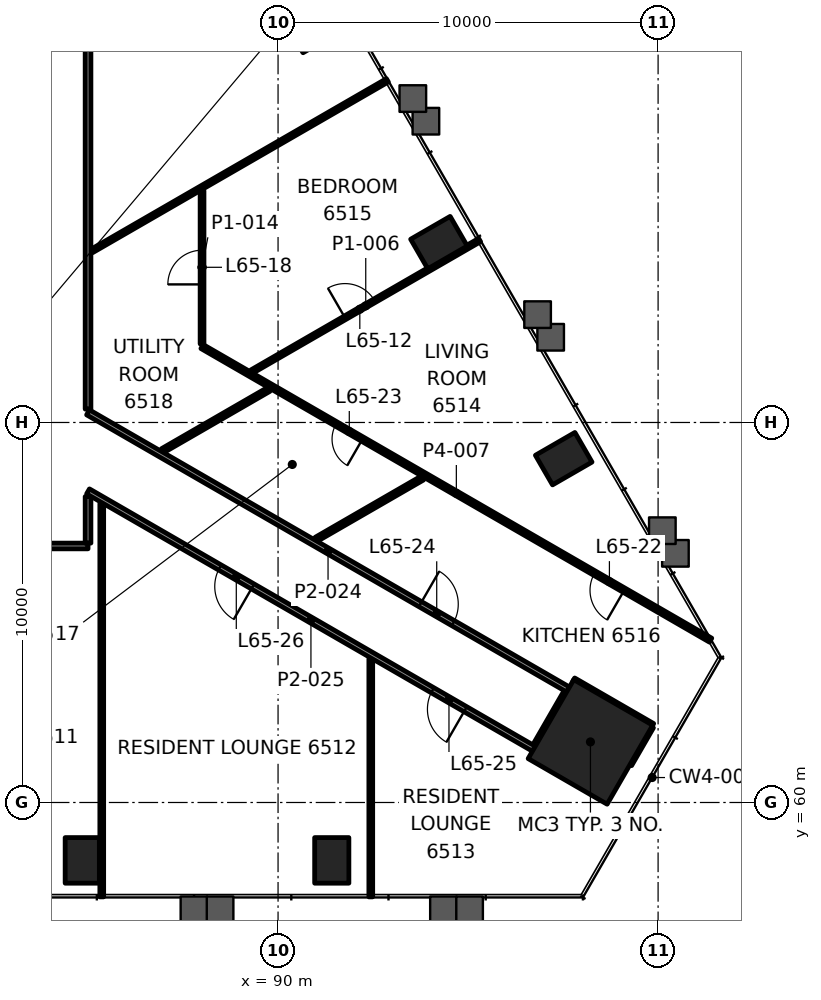
"""IFC4 building model, lengths in metres.
Left out: names, types, materials, properties, quantities, classifications, styles, units other than length and angle.
Written with IfcOpenShell. Run it as: python <this file> out.ifc"""

import sys

from ifc_helpers import new_model, si_unit, direction, frame, frame_2d, origin, origin_2d, place, context, subcontext, project, spatial, rectangle, hollow_rectangle, extrude, element, fill, save


model = new_model("IFC4")
c1 = context("Model", 3, precision=1e-05, world=origin(), true_north=direction((0.0, 1.0)))
c2 = subcontext(c1, "Body", "Model", "MODEL_VIEW")
j1 = project(units=[si_unit("LENGTHUNIT", "METRE"), si_unit("PLANEANGLEUNIT", "RADIAN")], contexts=[c1])
p1 = place(None, origin())
s1 = spatial("IfcSite", under=j1, at=p1, CompositionType="ELEMENT")
p2 = place(p1, origin())
s2 = spatial("IfcBuilding", under=s1, at=p2, CompositionType="ELEMENT")
p3 = place(p2, frame((0.0, 0.0, 274.1)))
s3 = spatial("IfcBuildingStorey", under=s2, at=p3, CompositionType="ELEMENT", Elevation=274.1)
p4 = place(p3, frame((98.22, 61.594, 0.0), z_axis=(0.0, 0.0, 1.0), x_axis=(0.5, 0.866025403784, 0.0)))
e1 = element("IfcColumn", 1, at=p4, inside=s3, PredefinedType="COLUMN", context=c2, shape_type="SweptSolid", body=[
    extrude(rectangle(XDim=2.4, YDim=2.4, at=origin_2d()), origin(), (0.0, 0.0, 1.0), 3.5),
])
for number, where, z_axis, x_axis in (
    (2, (84.848, 58.476, -0.0), (0.0, 0.0, 1.0), (1.0, 0.0, 0.0)),
    (3, (91.413, 58.476, -0.0), (0.0, 0.0, 1.0), (1.0, 0.0, 0.0)),
    (4, (97.517, 69.047, -0.0), (0.0, 0.0, 1.0), (-0.5, 0.866, 0.0)),
    (5, (94.234, 74.733, -0.0), (0.0, 0.0, 1.0), (-0.5, 0.866, 0.0)),
    (6, (90.951, 80.419, -0.0), (0.0, 0.0, 1.0), (-0.5, 0.866, 0.0)),
):
    element("IfcColumn", number, at=place(p3, frame(where, z_axis=z_axis, x_axis=x_axis)), inside=s3, PredefinedType="COLUMN", context=c2, shape_type="SweptSolid", body=[
        extrude(hollow_rectangle(XDim=0.9, YDim=1.2, WallThickness=0.06, at=origin_2d()), origin(), (0.0, 0.0, 1.0), 3.5),
    ])
p5 = place(p3, frame((85.0, 66.75, 0.0), z_axis=(0.0, 0.0, 1.0), x_axis=(-1.0, 0.0, 0.0)))
e7 = element("IfcWall", 7, at=p5, inside=s3, PredefinedType="PARTITIONING", context=c2, shape_type="SweptSolid", body=[
    extrude(rectangle(XDim=19.999, YDim=0.15, at=frame_2d((10.0, 0.0))), origin(), (0.0, 0.0, 1.0), 2.7),
])
p6 = place(p5, frame((2.96, 0.0, 0.0)))
e8 = element("IfcOpeningElement", 8, at=p6, cuts=e7, PredefinedType="OPENING", context=c2, shape_type="SweptSolid", body=[
    extrude(rectangle(XDim=1.0, YDim=2.1, at=frame_2d((0.5, 1.05))), frame((0.0, 0.085, 0.0), z_axis=(0.0, -1.0, 0.0), x_axis=(1.0, 0.0, 0.0)), (0.0, 0.0, 1.0), 0.17),
])
p7 = place(p5, frame((7.361, 0.0, 0.0)))
e9 = element("IfcOpeningElement", 9, at=p7, cuts=e7, PredefinedType="OPENING", context=c2, shape_type="SweptSolid", body=[
    extrude(rectangle(XDim=0.9, YDim=2.1, at=frame_2d((0.45, 1.05))), frame((0.0, 0.085, 0.0), z_axis=(0.0, -1.0, 0.0), x_axis=(1.0, 0.0, 0.0)), (0.0, 0.0, 1.0), 0.17),
])
p8 = place(p5, frame((9.55, 0.0, 0.0)))
e10 = element("IfcOpeningElement", 10, at=p8, cuts=e7, PredefinedType="OPENING", context=c2, shape_type="SweptSolid", body=[
    extrude(rectangle(XDim=0.9, YDim=2.1, at=frame_2d((0.45, 1.05))), frame((0.0, 0.085, 0.0), z_axis=(0.0, -1.0, 0.0), x_axis=(1.0, 0.0, 0.0)), (0.0, 0.0, 1.0), 0.17),
])
p9 = place(p5, frame((11.738, 0.0, 0.0)))
e11 = element("IfcOpeningElement", 11, at=p9, cuts=e7, PredefinedType="OPENING", context=c2, shape_type="SweptSolid", body=[
    extrude(rectangle(XDim=0.9, YDim=2.1, at=frame_2d((0.45, 1.05))), frame((0.0, 0.085, 0.0), z_axis=(0.0, -1.0, 0.0), x_axis=(1.0, 0.0, 0.0)), (0.0, 0.0, 1.0), 0.17),
])
p10 = place(p5, frame((13.926, 0.0, 0.0)))
e12 = element("IfcOpeningElement", 12, at=p10, cuts=e7, PredefinedType="OPENING", context=c2, shape_type="SweptSolid", body=[
    extrude(rectangle(XDim=0.9, YDim=2.1, at=frame_2d((0.45, 1.05))), frame((0.0, 0.085, 0.0), z_axis=(0.0, -1.0, 0.0), x_axis=(1.0, 0.0, 0.0)), (0.0, 0.0, 1.0), 0.17),
])
p11 = place(p3, frame((91.005, 66.926, 0.0), z_axis=(0.0, 0.0, 1.0), x_axis=(0.866000447062, 0.500043223821, 0.0)))
e13 = element("IfcWall", 13, at=p11, inside=s3, PredefinedType="PARTITIONING", context=c2, shape_type="SweptSolid", body=[
    extrude(rectangle(XDim=3.228, YDim=0.12, at=frame_2d((1.614, 0.0))), origin(), (0.0, 0.0, 1.0), 2.7),
])
p12 = place(p3, frame((86.963, 69.259, 0.0), z_axis=(0.0, 0.0, 1.0), x_axis=(0.866033195618, 0.499986503906, 0.0)))
e14 = element("IfcWall", 14, at=p12, inside=s3, PredefinedType="PARTITIONING", context=c2, shape_type="SweptSolid", body=[
    extrude(rectangle(XDim=3.228, YDim=0.12, at=frame_2d((1.614, 0.0))), origin(), (0.0, 0.0, 1.0), 2.7),
])
p13 = place(p3, frame((89.311, 71.34, 0.0), z_axis=(0.0, 0.0, 1.0), x_axis=(0.866013442838, 0.500020716395, 0.0)))
e15 = element("IfcWall", 15, at=p13, inside=s3, PredefinedType="PARTITIONING", context=c2, shape_type="SweptSolid", body=[
    extrude(rectangle(XDim=6.92, YDim=0.1, at=frame_2d((3.46, 0.0))), origin(), (0.0, 0.0, 1.0), 2.688),
])
p14 = place(p13, frame((2.83, 0.0, 0.0)))
e16 = element("IfcOpeningElement", 16, at=p14, cuts=e15, PredefinedType="OPENING", context=c2, shape_type="SweptSolid", body=[
    extrude(rectangle(XDim=0.9, YDim=2.1, at=frame_2d((0.45, 1.05))), frame((0.0, 0.06, 0.0), z_axis=(0.0, -1.0, 0.0), x_axis=(1.0, 0.0, 0.0)), (0.0, 0.0, 1.0), 0.12),
])
p15 = place(p3, frame((85.101, 74.514, 0.0), z_axis=(0.0, 0.0, 1.0), x_axis=(0.866020765707, 0.500008033299, 0.0)))
e17 = element("IfcWall", 17, at=p15, inside=s3, PredefinedType="PARTITIONING", context=c2, shape_type="SweptSolid", body=[
    extrude(rectangle(XDim=8.979, YDim=0.1, at=frame_2d((4.489, 0.0))), origin(), (0.0, 0.0, 1.0), 2.688),
])
p16 = place(p3, frame((99.259, 60.994, 0.0), z_axis=(0.0, 0.0, 1.0), x_axis=(0.499906209203, 0.866079547155, 0.0)))
e18 = element("IfcWall", 18, at=p16, inside=s3, PredefinedType="PARTITIONING", context=c2, shape_type="SweptSolid", body=[
    extrude(rectangle(XDim=1.15, YDim=0.1, at=frame_2d((0.575, 0.0))), origin(), (0.0, 0.0, 1.0), 2.7),
])
p17 = place(p3, frame((96.769, 61.48, 0.0), z_axis=(0.0, 0.0, 1.0), x_axis=(0.500035172766, 0.866005095826, 0.0)))
e19 = element("IfcWall", 19, at=p17, inside=s3, PredefinedType="PARTITIONING", context=c2, shape_type="SweptSolid", body=[
    extrude(rectangle(XDim=1.645, YDim=0.15, at=frame_2d((0.822, 0.0))), origin(), (0.0, 0.0, 1.0), 2.547),
])
p18 = place(p3, frame((92.44, 57.516, 0.0), z_axis=(0.0, 0.0, 1.0), x_axis=(0.0, 1.0, 0.0)))
e20 = element("IfcWall", 20, at=p18, inside=s3, PredefinedType="PARTITIONING", context=c2, shape_type="SweptSolid", body=[
    extrude(rectangle(XDim=6.259, YDim=0.1, at=frame_2d((3.129, 0.0))), origin(), (0.0, 0.0, 1.0), 2.7),
])
p19 = place(p3, frame((88.0, 72.067, 0.0), z_axis=(0.0, 0.0, 1.0), x_axis=(0.0, 1.0, 0.0)))
e21 = element("IfcWall", 21, at=p19, inside=s3, PredefinedType="PARTITIONING", context=c2, shape_type="SweptSolid", body=[
    extrude(rectangle(XDim=4.033, YDim=0.1, at=frame_2d((2.017, 0.0))), origin(), (0.0, 0.0, 1.0), 2.7),
])
p20 = place(p19, frame((1.567, 0.0, 0.0)))
e22 = element("IfcOpeningElement", 22, at=p20, cuts=e21, PredefinedType="OPENING", context=c2, shape_type="SweptSolid", body=[
    extrude(rectangle(XDim=0.9, YDim=2.1, at=frame_2d((0.45, 1.05))), frame((0.0, 0.06, 0.0), z_axis=(0.0, -1.0, 0.0), x_axis=(1.0, 0.0, 0.0)), (0.0, 0.0, 1.0), 0.12),
])
p21 = place(p3, frame((85.361, 57.516, 0.0), z_axis=(0.0, 0.0, 1.0), x_axis=(0.0, 1.0, 0.0)))
e23 = element("IfcWall", 23, at=p21, inside=s3, PredefinedType="PARTITIONING", context=c2, shape_type="SweptSolid", body=[
    extrude(rectangle(XDim=10.346, YDim=0.1, at=frame_2d((5.173, 0.0))), origin(), (0.0, 0.0, 1.0), 2.547),
])
p22 = place(p3, frame((85.0, 66.825, 0.0), z_axis=(0.0, 0.0, 1.0), x_axis=(0.0, 1.0, 0.0)))
e24 = element("IfcWall", 24, at=p22, inside=s3, PredefinedType="PARTITIONING", context=c2, shape_type="SweptSolid", body=[
    extrude(rectangle(XDim=1.225, YDim=0.15, at=frame_2d((0.613, 0.0))), origin(), (0.0, 0.0, 1.0), 2.547),
])
p23 = place(p3, frame((85.0, 70.352, 0.0), z_axis=(0.0, 0.0, 1.0), x_axis=(0.0, 1.0, 0.0)))
e25 = element("IfcWall", 25, at=p23, inside=s3, PredefinedType="PARTITIONING", context=c2, shape_type="SweptSolid", body=[
    extrude(rectangle(XDim=12.897, YDim=0.15, at=frame_2d((6.449, 0.0))), origin(), (0.0, 0.0, 1.0), 2.7),
])
p24 = place(p3, frame((101.383, 64.271, 0.0), z_axis=(0.0, 0.0, 1.0), x_axis=(-0.86602851656, 0.499994608475, 0.0)))
e26 = element("IfcWall", 26, at=p24, inside=s3, PredefinedType="PARTITIONING", context=c2, shape_type="SweptSolid", body=[
    extrude(rectangle(XDim=15.453, YDim=0.12, at=frame_2d((7.727, 0.0))), origin(), (0.0, 0.0, 1.0), 2.7),
])
p25 = place(p24, frame((2.626, 0.0, 0.0)))
e27 = element("IfcOpeningElement", 27, at=p25, cuts=e26, PredefinedType="OPENING", context=c2, shape_type="SweptSolid", body=[
    extrude(rectangle(XDim=0.9, YDim=2.1, at=frame_2d((0.45, 1.05))), frame((0.0, 0.07, 0.0), z_axis=(0.0, -1.0, 0.0), x_axis=(1.0, 0.0, 0.0)), (0.0, 0.0, 1.0), 0.14),
])
p26 = place(p24, frame((10.579, 0.0, 0.0)))
e28 = element("IfcOpeningElement", 28, at=p26, cuts=e26, PredefinedType="OPENING", context=c2, shape_type="SweptSolid", body=[
    extrude(rectangle(XDim=0.8, YDim=2.1, at=frame_2d((0.4, 1.05))), frame((0.0, 0.07, 0.0), z_axis=(0.0, -1.0, 0.0), x_axis=(1.0, 0.0, 0.0)), (0.0, 0.0, 1.0), 0.14),
])
p27 = place(p3, frame((99.859, 62.033, 0.0), z_axis=(0.0, 0.0, 1.0), x_axis=(-0.866050077142, 0.499957262057, 0.0)))
e29 = element("IfcWall", 29, at=p27, inside=s3, PredefinedType="PARTITIONING", context=c2, shape_type="SweptSolid", body=[
    extrude(rectangle(XDim=2.4, YDim=0.1, at=frame_2d((1.2, 0.0))), origin(), (0.0, 0.0, 1.0), 2.7),
])
p28 = place(p3, frame((85.0, 70.266, 0.0), z_axis=(0.0, 0.0, 1.0), x_axis=(0.866026970734, -0.499997285954, 0.0)))
e30 = element("IfcWall", 30, at=p28, inside=s3, PredefinedType="PARTITIONING", context=c2, shape_type="SweptSolid", body=[
    extrude(rectangle(XDim=14.584, YDim=0.15, at=frame_2d((7.292, 0.0))), origin(), (0.0, 0.0, 1.0), 2.7),
])
p29 = place(p28, frame((10.094, 0.0, 0.0)))
e31 = element("IfcOpeningElement", 31, at=p29, cuts=e30, PredefinedType="OPENING", context=c2, shape_type="SweptSolid", body=[
    extrude(rectangle(XDim=1.0, YDim=2.1, at=frame_2d((0.5, 1.05))), frame((0.0, 0.085, 0.0), z_axis=(0.0, -1.0, 0.0), x_axis=(1.0, 0.0, 0.0)), (0.0, 0.0, 1.0), 0.17),
])
p30 = place(p3, frame((96.73, 61.415, 0.0), z_axis=(0.0, 0.0, 1.0), x_axis=(-0.866032805753, 0.499987179195, 0.0)))
e32 = element("IfcWall", 32, at=p30, inside=s3, PredefinedType="PARTITIONING", context=c2, shape_type="SweptSolid", body=[
    extrude(rectangle(XDim=13.545, YDim=0.15, at=frame_2d((6.772, 0.0))), origin(), (0.0, 0.0, 1.0), 2.547),
])
p31 = place(p30, frame((2.078, 0.0, 0.0)))
e33 = element("IfcOpeningElement", 33, at=p31, cuts=e32, PredefinedType="OPENING", context=c2, shape_type="SweptSolid", body=[
    extrude(rectangle(XDim=1.0, YDim=2.1, at=frame_2d((0.5, 1.05))), frame((0.0, 0.085, 0.0), z_axis=(0.0, -1.0, 0.0), x_axis=(1.0, 0.0, 0.0)), (0.0, 0.0, 1.0), 0.17),
])
p32 = place(p30, frame((8.54, 0.0, 0.0)))
e34 = element("IfcOpeningElement", 34, at=p32, cuts=e32, PredefinedType="OPENING", context=c2, shape_type="SweptSolid", body=[
    extrude(rectangle(XDim=1.0, YDim=2.1, at=frame_2d((0.5, 1.05))), frame((0.0, 0.085, 0.0), z_axis=(0.0, -1.0, 0.0), x_axis=(1.0, 0.0, 0.0)), (0.0, 0.0, 1.0), 0.17),
])
p33 = place(p14, origin())
e35 = element("IfcDoor", 35, at=p33, inside=s3, OperationType="SINGLE_SWING_LEFT", PredefinedType="DOOR", context=c2, shape_type="SweptSolid", body=[
    extrude(rectangle(XDim=0.9, YDim=2.1, at=frame_2d((0.45, 1.05))), frame((0.0, 0.025, 0.0), z_axis=(0.0, -1.0, 0.0), x_axis=(1.0, 0.0, 0.0)), (0.0, 0.0, 1.0), 0.05),
])
fill(e16, e35)
p34 = place(p20, origin())
e36 = element("IfcDoor", 36, at=p34, inside=s3, OperationType="SINGLE_SWING_LEFT", PredefinedType="DOOR", context=c2, shape_type="SweptSolid", body=[
    extrude(rectangle(XDim=0.9, YDim=2.1, at=frame_2d((0.45, 1.05))), frame((0.0, 0.025, 0.0), z_axis=(0.0, -1.0, 0.0), x_axis=(1.0, 0.0, 0.0)), (0.0, 0.0, 1.0), 0.05),
])
fill(e22, e36)
p35 = place(p25, origin())
e37 = element("IfcDoor", 37, at=p35, inside=s3, OperationType="SINGLE_SWING_LEFT", PredefinedType="DOOR", context=c2, shape_type="SweptSolid", body=[
    extrude(rectangle(XDim=0.9, YDim=2.1, at=frame_2d((0.45, 1.05))), frame((0.0, 0.025, 0.0), z_axis=(0.0, -1.0, 0.0), x_axis=(1.0, 0.0, 0.0)), (0.0, 0.0, 1.0), 0.05),
])
fill(e27, e37)
p36 = place(p26, origin())
e38 = element("IfcDoor", 38, at=p36, inside=s3, OperationType="SINGLE_SWING_RIGHT", PredefinedType="DOOR", context=c2, shape_type="SweptSolid", body=[
    extrude(rectangle(XDim=0.8, YDim=2.1, at=frame_2d((0.4, 1.05))), frame((0.0, 0.025, 0.0), z_axis=(0.0, -1.0, 0.0), x_axis=(1.0, 0.0, 0.0)), (0.0, 0.0, 1.0), 0.05),
])
fill(e28, e38)
p37 = place(p29, origin())
e39 = element("IfcDoor", 39, at=p37, inside=s3, OperationType="SINGLE_SWING_LEFT", PredefinedType="DOOR", context=c2, shape_type="SweptSolid", body=[
    extrude(rectangle(XDim=1.0, YDim=2.1, at=frame_2d((0.5, 1.05))), frame((0.0, 0.025, 0.0), z_axis=(0.0, -1.0, 0.0), x_axis=(1.0, 0.0, 0.0)), (0.0, 0.0, 1.0), 0.05),
])
fill(e31, e39)
p38 = place(p31, origin())
e40 = element("IfcDoor", 40, at=p38, inside=s3, OperationType="SINGLE_SWING_RIGHT", PredefinedType="DOOR", context=c2, shape_type="SweptSolid", body=[
    extrude(rectangle(XDim=1.0, YDim=2.1, at=frame_2d((0.5, 1.05))), frame((0.0, 0.025, 0.0), z_axis=(0.0, -1.0, 0.0), x_axis=(1.0, 0.0, 0.0)), (0.0, 0.0, 1.0), 0.05),
])
fill(e33, e40)
p39 = place(p32, origin())
e41 = element("IfcDoor", 41, at=p39, inside=s3, OperationType="SINGLE_SWING_LEFT", PredefinedType="DOOR", context=c2, shape_type="SweptSolid", body=[
    extrude(rectangle(XDim=1.0, YDim=2.1, at=frame_2d((0.5, 1.05))), frame((0.0, 0.025, 0.0), z_axis=(0.0, -1.0, 0.0), x_axis=(1.0, 0.0, 0.0)), (0.0, 0.0, 1.0), 0.05),
])
fill(e34, e41)
save(model, sys.argv[1])
